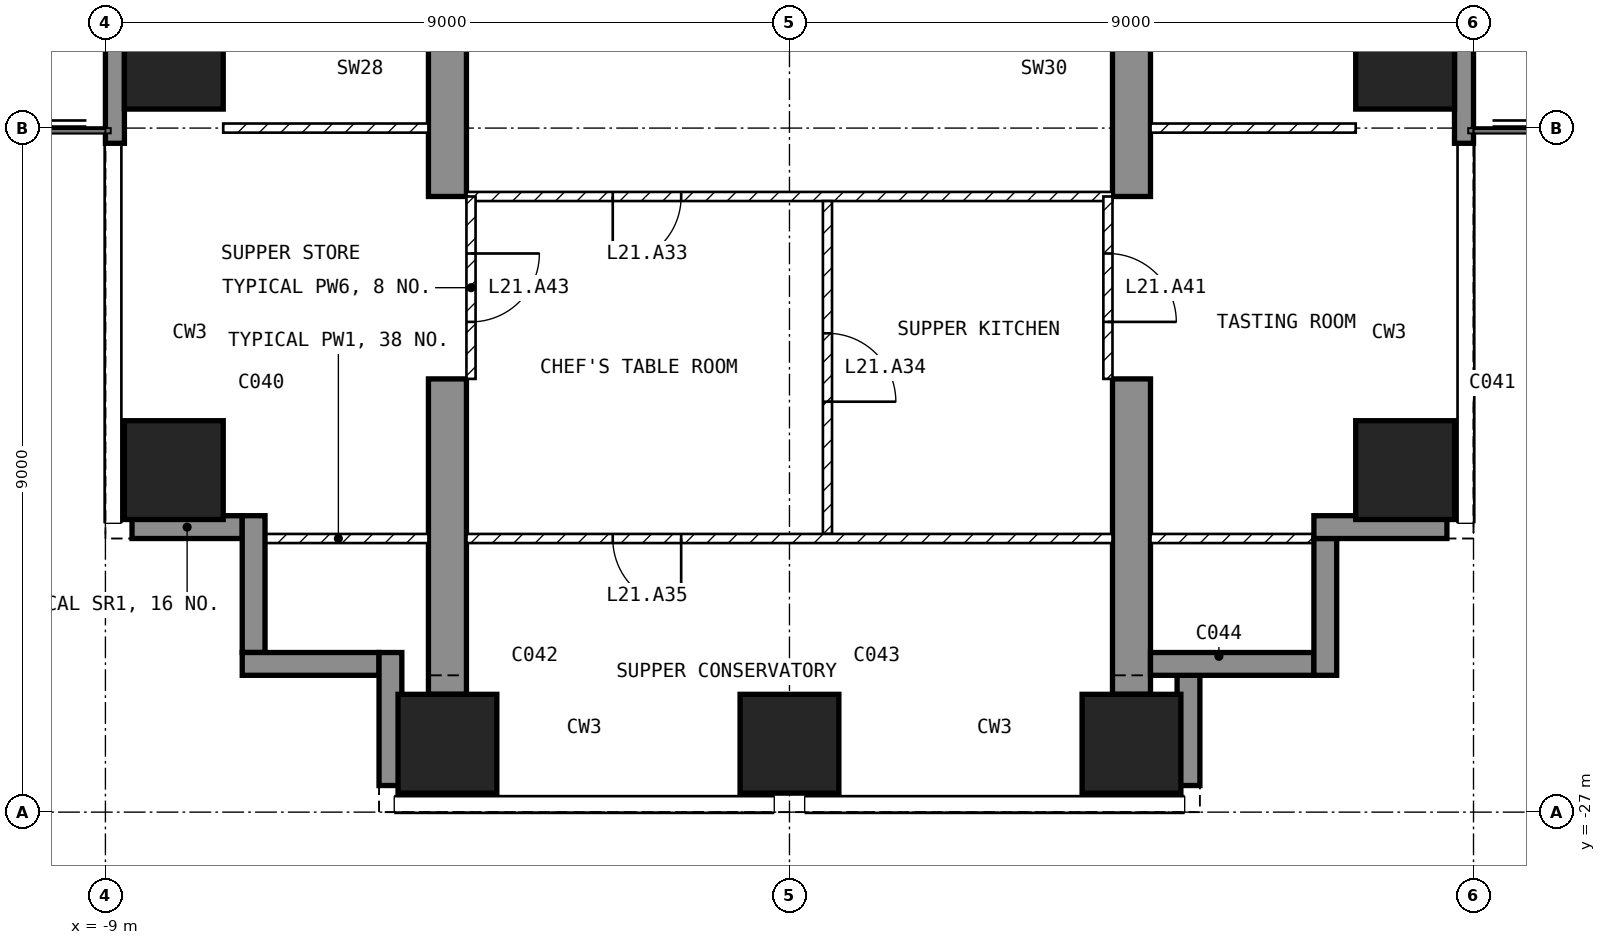
"""IFC4 building model, lengths in metres.
Left out: names, types, materials, properties, quantities, classifications, styles, units other than length and angle.
Written with IfcOpenShell. Run it as: python <this file> out.ifc"""

import sys

from ifc_helpers import new_model, si_unit, direction, frame, frame_2d, origin, origin_2d, place, context, subcontext, project, spatial, polyline, rectangle, outline, extrude, element, fill, save


model = new_model("IFC4")
c1 = context("Model", 3, precision=1e-05, world=origin(), true_north=direction((0.0, 1.0)))
c2 = subcontext(c1, "Body", "Model", "MODEL_VIEW")
j1 = project(units=[si_unit("LENGTHUNIT", "METRE"), si_unit("PLANEANGLEUNIT", "RADIAN")], contexts=[c1])
p1 = place(None, origin())
s1 = spatial("IfcSite", under=j1, at=p1, CompositionType="ELEMENT")
p2 = place(p1, origin())
s2 = spatial("IfcBuilding", under=s1, at=p2, CompositionType="ELEMENT")
p3 = place(p2, frame((0.0, 0.0, 92.5)))
s3 = spatial("IfcBuildingStorey", under=s2, at=p3, CompositionType="ELEMENT", Elevation=92.5)
for number, where, z_axis, x_axis in (
    (1, (-8.1, -22.5, -0.3), (0.0, 0.0, 1.0), (1.0, 0.0, 0.0)),
    (2, (-8.1, -17.1, -0.3), (0.0, 0.0, 1.0), (1.0, 0.0, 0.0)),
    (3, (-4.5, -26.1, -0.3), (0.0, 0.0, 1.0), (1.0, 0.0, 0.0)),
    (4, (0.0, -26.1, -0.3), (0.0, 0.0, 1.0), (1.0, 0.0, 0.0)),
    (5, (4.5, -26.1, -0.3), (0.0, 0.0, 1.0), (1.0, 0.0, 0.0)),
    (6, (8.1, -22.5, -0.3), (0.0, 0.0, 1.0), (1.0, 0.0, 0.0)),
    (7, (8.1, -17.1, -0.3), (0.0, 0.0, 1.0), (1.0, 0.0, 0.0)),
):
    element("IfcColumn", number, at=place(p3, frame(where, z_axis=z_axis, x_axis=x_axis)), inside=s3, PredefinedType="COLUMN", context=c2, shape_type="SweptSolid", body=[
        extrude(rectangle(XDim=1.3, YDim=1.3, at=origin_2d()), origin(), (0.0, 0.0, 1.0), 5.25),
    ])
for number, where, z_axis, x_axis in (
    (8, (-4.75, -25.45, -0.3), (1.0, 0.0, 0.0), (0.0, 1.0, 0.0)),
    (9, (4.25, -25.45, -0.3), (1.0, 0.0, 0.0), (0.0, 1.0, 0.0)),
):
    element("IfcWall", number, at=place(p3, frame(where, z_axis=z_axis, x_axis=x_axis)), inside=s3, PredefinedType="SHEAR", context=c2, shape_type="SweptSolid", body=[
        extrude(outline(polyline([(0.0, 0.0), (4.15, 0.0), (4.15, 2.7), (6.55, 2.7), (6.55, 0.0), (11.95, 0.0), (11.95, 2.7), (14.35, 2.7), (14.35, 0.0), (16.45, 0.0), (16.45, 5.25), (0.0, 5.25), (0.0, 0.0)])), origin(), (0.0, 0.0, 1.0), 0.5),
    ])
p4 = place(p3, frame((-8.875, -14.65, 0.0), z_axis=(0.0, 0.0, 1.0), x_axis=(0.0, -1.0, 0.0)))
e10 = element("IfcWall", 10, at=p4, inside=s3, PredefinedType="SOLIDWALL", context=c2, shape_type="SweptSolid", body=[
    extrude(rectangle(XDim=3.55, YDim=0.25, at=frame_2d((1.775, 0.0))), origin(), (0.0, 0.0, 1.0), 4.95),
])
p5 = place(p4, frame((0.25, 0.0, 0.0)))
e11 = element("IfcOpeningElement", 11, at=p5, cuts=e10, PredefinedType="OPENING", context=c2, shape_type="SweptSolid", body=[
    extrude(rectangle(XDim=1.2, YDim=2.4, at=frame_2d((0.6, 1.2))), frame((0.0, 0.135, 0.0), z_axis=(0.0, -1.0, 0.0), x_axis=(1.0, 0.0, 0.0)), (0.0, 0.0, 1.0), 0.27),
])
p6 = place(p3, frame((8.875, -18.2, 0.0), z_axis=(0.0, 0.0, 1.0), x_axis=(0.0, 1.0, 0.0)))
e12 = element("IfcWall", 12, at=p6, inside=s3, PredefinedType="SOLIDWALL", context=c2, shape_type="SweptSolid", body=[
    extrude(rectangle(XDim=3.55, YDim=0.25, at=frame_2d((1.775, 0.0))), origin(), (0.0, 0.0, 1.0), 4.95),
])
p7 = place(p6, frame((2.1, 0.0, 0.0)))
e13 = element("IfcOpeningElement", 13, at=p7, cuts=e12, PredefinedType="OPENING", context=c2, shape_type="SweptSolid", body=[
    extrude(rectangle(XDim=1.2, YDim=2.4, at=frame_2d((0.6, 1.2))), frame((0.0, 0.135, 0.0), z_axis=(0.0, -1.0, 0.0), x_axis=(1.0, 0.0, 0.0)), (0.0, 0.0, 1.0), 0.27),
])
p8 = place(p3, frame((5.25, -26.65, 0.0), z_axis=(0.0, 0.0, 1.0), x_axis=(0.0, 1.0, 0.0)))
e14 = element("IfcWall", 14, at=p8, inside=s3, PredefinedType="SOLIDWALL", context=c2, shape_type="SweptSolid", body=[
    extrude(rectangle(XDim=1.45, YDim=0.3, at=frame_2d((0.725, 0.0))), origin(), (0.0, 0.0, 1.0), 4.95),
])
p9 = place(p3, frame((4.75, -25.05, 0.0), z_axis=(0.0, 0.0, 1.0), x_axis=(1.0, 0.0, 0.0)))
e15 = element("IfcWall", 15, at=p9, inside=s3, PredefinedType="SOLIDWALL", context=c2, shape_type="SweptSolid", body=[
    extrude(rectangle(XDim=2.15, YDim=0.3, at=frame_2d((1.075, 0.0))), origin(), (0.0, 0.0, 1.0), 4.95),
])
p10 = place(p3, frame((7.05, -25.2, 0.0), z_axis=(0.0, 0.0, 1.0), x_axis=(0.0, 1.0, 0.0)))
e16 = element("IfcWall", 16, at=p10, inside=s3, PredefinedType="SOLIDWALL", context=c2, shape_type="SweptSolid", body=[
    extrude(rectangle(XDim=1.8, YDim=0.3, at=frame_2d((0.9, 0.0))), origin(), (0.0, 0.0, 1.0), 4.95),
])
p11 = place(p3, frame((6.9, -23.25, 0.0), z_axis=(0.0, 0.0, 1.0), x_axis=(1.0, 0.0, 0.0)))
e17 = element("IfcWall", 17, at=p11, inside=s3, PredefinedType="SOLIDWALL", context=c2, shape_type="SweptSolid", body=[
    extrude(rectangle(XDim=1.75, YDim=0.3, at=frame_2d((0.875, 0.0))), origin(), (0.0, 0.0, 1.0), 4.95),
])
p12 = place(p3, frame((-8.65, -23.25, 0.0), z_axis=(0.0, 0.0, 1.0), x_axis=(1.0, 0.0, 0.0)))
e18 = element("IfcWall", 18, at=p12, inside=s3, PredefinedType="SOLIDWALL", context=c2, shape_type="SweptSolid", body=[
    extrude(rectangle(XDim=1.45, YDim=0.3, at=frame_2d((0.725, 0.0))), origin(), (0.0, 0.0, 1.0), 4.95),
])
p13 = place(p3, frame((-7.05, -23.1, 0.0), z_axis=(0.0, 0.0, 1.0), x_axis=(0.0, -1.0, 0.0)))
e19 = element("IfcWall", 19, at=p13, inside=s3, PredefinedType="SOLIDWALL", context=c2, shape_type="SweptSolid", body=[
    extrude(rectangle(XDim=1.8, YDim=0.3, at=frame_2d((0.9, 0.0))), origin(), (0.0, 0.0, 1.0), 4.95),
])
p14 = place(p3, frame((-7.2, -25.05, 0.0), z_axis=(0.0, 0.0, 1.0), x_axis=(1.0, 0.0, 0.0)))
e20 = element("IfcWall", 20, at=p14, inside=s3, PredefinedType="SOLIDWALL", context=c2, shape_type="SweptSolid", body=[
    extrude(rectangle(XDim=1.8, YDim=0.3, at=frame_2d((0.9, 0.0))), origin(), (0.0, 0.0, 1.0), 4.95),
])
p15 = place(p3, frame((-5.25, -24.9, 0.0), z_axis=(0.0, 0.0, 1.0), x_axis=(0.0, -1.0, 0.0)))
e21 = element("IfcWall", 21, at=p15, inside=s3, PredefinedType="SOLIDWALL", context=c2, shape_type="SweptSolid", body=[
    extrude(rectangle(XDim=1.75, YDim=0.3, at=frame_2d((0.875, 0.0))), origin(), (0.0, 0.0, 1.0), 4.95),
])
p16 = place(p3, frame((4.25, -18.9, 0.0), z_axis=(0.0, 0.0, 1.0), x_axis=(-1.0, 0.0, 0.0)))
e22 = element("IfcWall", 22, at=p16, inside=s3, PredefinedType="PARTITIONING", context=c2, shape_type="SweptSolid", body=[
    extrude(rectangle(XDim=8.5, YDim=0.12, at=frame_2d((4.25, 0.0))), origin(), (0.0, 0.0, 1.0), 4.95),
])
p17 = place(p16, frame((5.675, 0.0, 0.0)))
e23 = element("IfcOpeningElement", 23, at=p17, cuts=e22, PredefinedType="OPENING", context=c2, shape_type="SweptSolid", body=[
    extrude(rectangle(XDim=0.9, YDim=2.1, at=frame_2d((0.45, 1.05))), frame((0.0, 0.07, 0.0), z_axis=(0.0, -1.0, 0.0), x_axis=(1.0, 0.0, 0.0)), (0.0, 0.0, 1.0), 0.14),
])
p18 = place(p3, frame((0.5, -18.96, 0.0), z_axis=(0.0, 0.0, 1.0), x_axis=(0.0, -1.0, 0.0)))
e24 = element("IfcWall", 24, at=p18, inside=s3, PredefinedType="PARTITIONING", context=c2, shape_type="SweptSolid", body=[
    extrude(rectangle(XDim=4.38, YDim=0.12, at=frame_2d((2.19, 0.0))), origin(), (0.0, 0.0, 1.0), 4.95),
])
p19 = place(p18, frame((1.74, 0.0, 0.0)))
e25 = element("IfcOpeningElement", 25, at=p19, cuts=e24, PredefinedType="OPENING", context=c2, shape_type="SweptSolid", body=[
    extrude(rectangle(XDim=0.9, YDim=2.1, at=frame_2d((0.45, 1.05))), frame((0.0, 0.07, 0.0), z_axis=(0.0, -1.0, 0.0), x_axis=(1.0, 0.0, 0.0)), (0.0, 0.0, 1.0), 0.14),
])
p20 = place(p3, frame((4.25, -23.4, 0.0), z_axis=(0.0, 0.0, 1.0), x_axis=(-1.0, 0.0, 0.0)))
e26 = element("IfcWall", 26, at=p20, inside=s3, PredefinedType="PARTITIONING", context=c2, shape_type="SweptSolid", body=[
    extrude(rectangle(XDim=8.5, YDim=0.12, at=frame_2d((4.25, 0.0))), origin(), (0.0, 0.0, 1.0), 4.95),
])
p21 = place(p20, frame((5.675, 0.0, 0.0)))
e27 = element("IfcOpeningElement", 27, at=p21, cuts=e26, PredefinedType="OPENING", context=c2, shape_type="SweptSolid", body=[
    extrude(rectangle(XDim=0.9, YDim=2.1, at=frame_2d((0.45, 1.05))), frame((0.0, 0.07, 0.0), z_axis=(0.0, -1.0, 0.0), x_axis=(1.0, 0.0, 0.0)), (0.0, 0.0, 1.0), 0.14),
])
p22 = place(p3, frame((7.45, -18.0, 0.0), z_axis=(0.0, 0.0, 1.0), x_axis=(-1.0, 0.0, 0.0)))
e28 = element("IfcWall", 28, at=p22, inside=s3, PredefinedType="PARTITIONING", context=c2, shape_type="SweptSolid", body=[
    extrude(rectangle(XDim=2.7, YDim=0.12, at=frame_2d((1.35, 0.0))), origin(), (0.0, 0.0, 1.0), 4.95),
])
p23 = place(p3, frame((7.12, -23.4, 0.0), z_axis=(0.0, 0.0, 1.0), x_axis=(-1.0, 0.0, 0.0)))
e29 = element("IfcWall", 29, at=p23, inside=s3, PredefinedType="PARTITIONING", context=c2, shape_type="SweptSolid", body=[
    extrude(rectangle(XDim=2.37, YDim=0.12, at=frame_2d((1.185, 0.0))), origin(), (0.0, 0.0, 1.0), 4.95),
])
p24 = place(p3, frame((-4.75, -18.0, 0.0), z_axis=(0.0, 0.0, 1.0), x_axis=(-1.0, 0.0, 0.0)))
e30 = element("IfcWall", 30, at=p24, inside=s3, PredefinedType="PARTITIONING", context=c2, shape_type="SweptSolid", body=[
    extrude(rectangle(XDim=2.7, YDim=0.12, at=frame_2d((1.35, 0.0))), origin(), (0.0, 0.0, 1.0), 4.95),
])
p25 = place(p3, frame((-4.75, -23.4, 0.0), z_axis=(0.0, 0.0, 1.0), x_axis=(-1.0, 0.0, 0.0)))
e31 = element("IfcWall", 31, at=p25, inside=s3, PredefinedType="PARTITIONING", context=c2, shape_type="SweptSolid", body=[
    extrude(rectangle(XDim=2.37, YDim=0.12, at=frame_2d((1.185, 0.0))), origin(), (0.0, 0.0, 1.0), 4.95),
])
p26 = place(p3, frame((4.19, -18.9, 0.0), z_axis=(0.0, 0.0, 1.0), x_axis=(0.0, -1.0, 0.0)))
e32 = element("IfcWall", 32, at=p26, inside=s3, PredefinedType="PARTITIONING", context=c2, shape_type="SweptSolid", body=[
    extrude(rectangle(XDim=2.4, YDim=0.12, at=frame_2d((1.2, 0.0))), origin(), (0.0, 0.0, 1.0), 2.4),
])
p27 = place(p26, frame((0.75, 0.0, 0.0)))
e33 = element("IfcOpeningElement", 33, at=p27, cuts=e32, PredefinedType="OPENING", context=c2, shape_type="SweptSolid", body=[
    extrude(rectangle(XDim=0.9, YDim=2.1, at=frame_2d((0.45, 1.05))), frame((0.0, 0.07, 0.0), z_axis=(0.0, -1.0, 0.0), x_axis=(1.0, 0.0, 0.0)), (0.0, 0.0, 1.0), 0.14),
])
p28 = place(p3, frame((-4.19, -18.9, 0.0), z_axis=(0.0, 0.0, 1.0), x_axis=(0.0, -1.0, 0.0)))
e34 = element("IfcWall", 34, at=p28, inside=s3, PredefinedType="PARTITIONING", context=c2, shape_type="SweptSolid", body=[
    extrude(rectangle(XDim=2.4, YDim=0.12, at=frame_2d((1.2, 0.0))), origin(), (0.0, 0.0, 1.0), 2.4),
])
p29 = place(p28, frame((0.75, 0.0, 0.0)))
e35 = element("IfcOpeningElement", 35, at=p29, cuts=e34, PredefinedType="OPENING", context=c2, shape_type="SweptSolid", body=[
    extrude(rectangle(XDim=0.9, YDim=2.1, at=frame_2d((0.45, 1.05))), frame((0.0, 0.07, 0.0), z_axis=(0.0, -1.0, 0.0), x_axis=(1.0, 0.0, 0.0)), (0.0, 0.0, 1.0), 0.14),
])
p30 = place(p17, origin())
e36 = element("IfcDoor", 36, at=p30, inside=s3, OperationType="SINGLE_SWING_RIGHT", PredefinedType="DOOR", context=c2, shape_type="SweptSolid", body=[
    extrude(rectangle(XDim=0.9, YDim=2.1, at=frame_2d((0.45, 1.05))), frame((0.0, 0.025, 0.0), z_axis=(0.0, -1.0, 0.0), x_axis=(1.0, 0.0, 0.0)), (0.0, 0.0, 1.0), 0.05),
])
fill(e23, e36)
p31 = place(p19, origin())
e37 = element("IfcDoor", 37, at=p31, inside=s3, OperationType="SINGLE_SWING_RIGHT", PredefinedType="DOOR", context=c2, shape_type="SweptSolid", body=[
    extrude(rectangle(XDim=0.9, YDim=2.1, at=frame_2d((0.45, 1.05))), frame((0.0, 0.025, 0.0), z_axis=(0.0, -1.0, 0.0), x_axis=(1.0, 0.0, 0.0)), (0.0, 0.0, 1.0), 0.05),
])
fill(e25, e37)
p32 = place(p21, origin())
e38 = element("IfcDoor", 38, at=p32, inside=s3, OperationType="SINGLE_SWING_LEFT", PredefinedType="DOOR", context=c2, shape_type="SweptSolid", body=[
    extrude(rectangle(XDim=0.9, YDim=2.1, at=frame_2d((0.45, 1.05))), frame((0.0, 0.025, 0.0), z_axis=(0.0, -1.0, 0.0), x_axis=(1.0, 0.0, 0.0)), (0.0, 0.0, 1.0), 0.05),
])
fill(e27, e38)
p33 = place(p27, origin())
e39 = element("IfcDoor", 39, at=p33, inside=s3, OperationType="SINGLE_SWING_RIGHT", PredefinedType="DOOR", context=c2, shape_type="SweptSolid", body=[
    extrude(rectangle(XDim=0.9, YDim=2.1, at=frame_2d((0.45, 1.05))), frame((0.0, 0.025, 0.0), z_axis=(0.0, -1.0, 0.0), x_axis=(1.0, 0.0, 0.0)), (0.0, 0.0, 1.0), 0.05),
])
fill(e33, e39)
p34 = place(p29, origin())
e40 = element("IfcDoor", 40, at=p34, inside=s3, OperationType="SINGLE_SWING_LEFT", PredefinedType="DOOR", context=c2, shape_type="SweptSolid", body=[
    extrude(rectangle(XDim=0.9, YDim=2.1, at=frame_2d((0.45, 1.05))), frame((0.0, 0.025, 0.0), z_axis=(0.0, -1.0, 0.0), x_axis=(1.0, 0.0, 0.0)), (0.0, 0.0, 1.0), 0.05),
])
fill(e35, e40)
save(model, sys.argv[1])
